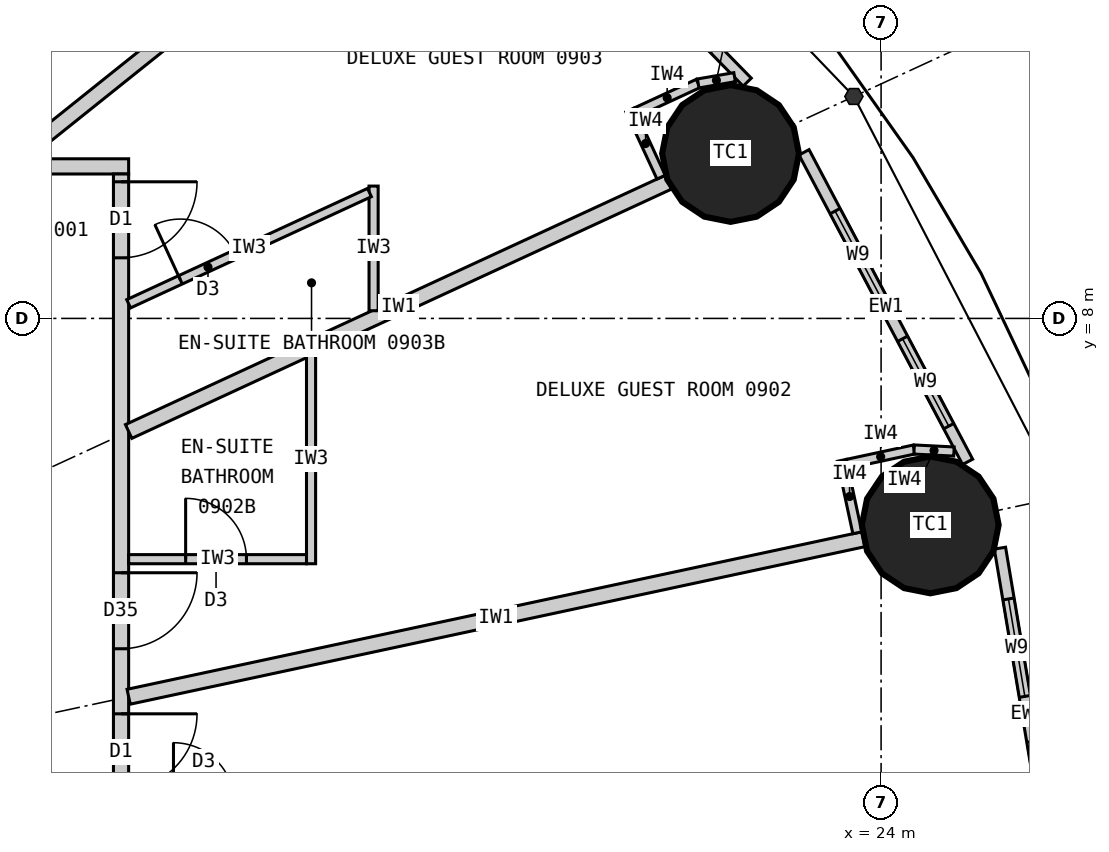
"""IFC4 building model, lengths in metres.
Left out: names, types, materials, properties, quantities, classifications, styles, units other than length and angle.
Written with IfcOpenShell. Run it as: python <this file> out.ifc"""

import sys

from ifc_helpers import new_model, si_unit, direction, frame, frame_2d, origin, origin_2d, place, context, subcontext, project, spatial, rectangle, circle, extrude, element, fill, save


model = new_model("IFC4")
c1 = context("Model", 3, precision=1e-05, world=origin(), true_north=direction((0.0, 1.0)))
c2 = subcontext(c1, "Body", "Model", "MODEL_VIEW")
j1 = project(units=[si_unit("LENGTHUNIT", "METRE"), si_unit("PLANEANGLEUNIT", "RADIAN")], contexts=[c1])
p1 = place(None, origin())
s1 = spatial("IfcSite", under=j1, at=p1, CompositionType="ELEMENT")
p2 = place(p1, origin())
s2 = spatial("IfcBuilding", under=s1, at=p2, CompositionType="ELEMENT")
p3 = place(p2, frame((0.0, 0.0, 42.6)))
s3 = spatial("IfcBuildingStorey", under=s2, at=p3, CompositionType="ELEMENT", Elevation=42.6)
for number, where, z_axis, x_axis in (
    (1, (24.647, 5.283, 0.0), (0.0, 0.0, 1.0), (1.0, 0.0, 0.0)),
    (2, (22.019, 10.17, 0.0), (0.0, 0.0, 1.0), (1.0, 0.0, 0.0)),
):
    element("IfcColumn", number, at=place(p3, frame(where, z_axis=z_axis, x_axis=x_axis)), inside=s3, PredefinedType="COLUMN", context=c2, shape_type="SweptSolid", body=[
        extrude(circle(Radius=0.9, at=origin_2d()), origin(), (0.0, 0.0, 1.0), 3.3),
    ])
p4 = place(p3, frame((26.297, 0.611, 0.0), z_axis=(0.0, 0.0, 1.0), x_axis=(-0.165641751141, 0.986185991727, 0.0)))
e3 = element("IfcWall", 3, at=p4, inside=s3, PredefinedType="ELEMENTEDWALL", context=c2, shape_type="SweptSolid", body=[
    extrude(rectangle(XDim=4.428, YDim=0.15, at=frame_2d((2.214, 0.0))), origin(), (0.0, 0.0, 1.0), 3.05),
])
p5 = place(p4, frame((0.55, 0.0, 0.9)))
e4 = element("IfcOpeningElement", 4, at=p5, cuts=e3, PredefinedType="OPENING", context=c2, shape_type="SweptSolid", body=[
    extrude(rectangle(XDim=1.3, YDim=1.9, at=frame_2d((0.65, 0.95))), frame((0.0, 0.085, 0.0), z_axis=(0.0, -1.0, 0.0), x_axis=(1.0, 0.0, 0.0)), (0.0, 0.0, 1.0), 0.17),
])
p6 = place(p4, frame((2.45, 0.0, 0.9)))
e5 = element("IfcOpeningElement", 5, at=p6, cuts=e3, PredefinedType="OPENING", context=c2, shape_type="SweptSolid", body=[
    extrude(rectangle(XDim=1.3, YDim=1.9, at=frame_2d((0.65, 0.95))), frame((0.0, 0.085, 0.0), z_axis=(0.0, -1.0, 0.0), x_axis=(1.0, 0.0, 0.0)), (0.0, 0.0, 1.0), 0.17),
])
p7 = place(p3, frame((25.139, 6.113, 0.0), z_axis=(0.0, 0.0, 1.0), x_axis=(-0.467303182954, 0.884097129959, 0.0)))
e6 = element("IfcWall", 6, at=p7, inside=s3, PredefinedType="ELEMENTEDWALL", context=c2, shape_type="SweptSolid", body=[
    extrude(rectangle(XDim=4.606, YDim=0.15, at=frame_2d((2.303, 0.0))), origin(), (0.0, 0.0, 1.0), 3.05),
])
p8 = place(p7, frame((0.531, 0.0, 0.9)))
e7 = element("IfcOpeningElement", 7, at=p8, cuts=e6, PredefinedType="OPENING", context=c2, shape_type="SweptSolid", body=[
    extrude(rectangle(XDim=1.3, YDim=1.9, at=frame_2d((0.65, 0.95))), frame((0.0, 0.085, 0.0), z_axis=(0.0, -1.0, 0.0), x_axis=(1.0, 0.0, 0.0)), (0.0, 0.0, 1.0), 0.17),
])
p9 = place(p7, frame((2.432, 0.0, 0.9)))
e8 = element("IfcOpeningElement", 8, at=p9, cuts=e6, PredefinedType="OPENING", context=c2, shape_type="SweptSolid", body=[
    extrude(rectangle(XDim=1.3, YDim=1.9, at=frame_2d((0.65, 0.95))), frame((0.0, 0.085, 0.0), z_axis=(0.0, -1.0, 0.0), x_axis=(1.0, 0.0, 0.0)), (0.0, 0.0, 1.0), 0.17),
])
p10 = place(p3, frame((22.239, 11.108, 0.0), z_axis=(0.0, 0.0, 1.0), x_axis=(-0.699612594083, 0.714522370679, 0.0)))
e9 = element("IfcWall", 9, at=p10, inside=s3, PredefinedType="ELEMENTEDWALL", context=c2, shape_type="SweptSolid", body=[
    extrude(rectangle(XDim=4.896, YDim=0.15, at=frame_2d((2.448, 0.0))), origin(), (0.0, 0.0, 1.0), 3.05),
])
p11 = place(p10, frame((0.619, 0.0, 0.9)))
e10 = element("IfcOpeningElement", 10, at=p11, cuts=e9, PredefinedType="OPENING", context=c2, shape_type="SweptSolid", body=[
    extrude(rectangle(XDim=1.3, YDim=1.9, at=frame_2d((0.65, 0.95))), frame((0.0, 0.085, 0.0), z_axis=(0.0, -1.0, 0.0), x_axis=(1.0, 0.0, 0.0)), (0.0, 0.0, 1.0), 0.17),
])
p12 = place(p10, frame((2.519, 0.0, 0.9)))
e11 = element("IfcOpeningElement", 11, at=p12, cuts=e9, PredefinedType="OPENING", context=c2, shape_type="SweptSolid", body=[
    extrude(rectangle(XDim=1.3, YDim=1.9, at=frame_2d((0.65, 0.95))), frame((0.0, 0.085, 0.0), z_axis=(0.0, -1.0, 0.0), x_axis=(1.0, 0.0, 0.0)), (0.0, 0.0, 1.0), 0.17),
])
p13 = place(p3, frame((-14.1, 10.0, 0.0), z_axis=(0.0, 0.0, 1.0), x_axis=(1.0, 0.0, 0.0)))
e12 = element("IfcWall", 12, at=p13, inside=s3, PredefinedType="PARTITIONING", context=c2, shape_type="SweptSolid", body=[
    extrude(rectangle(XDim=28.2, YDim=0.2, at=frame_2d((14.1, 0.0))), origin(), (0.0, 0.0, 1.0), 3.05),
])
p14 = place(p13, frame((23.477, 0.0, 0.0)))
e13 = element("IfcOpeningElement", 13, at=p14, cuts=e12, PredefinedType="OPENING", context=c2, shape_type="SweptSolid", body=[
    extrude(rectangle(XDim=1.0, YDim=2.2, at=frame_2d((0.5, 1.1))), frame((0.0, 0.11, 0.0), z_axis=(0.0, -1.0, 0.0), x_axis=(1.0, 0.0, 0.0)), (0.0, 0.0, 1.0), 0.22),
])
p15 = place(p13, frame((18.529, 0.0, 0.0)))
e14 = element("IfcOpeningElement", 14, at=p15, cuts=e12, PredefinedType="OPENING", context=c2, shape_type="SweptSolid", body=[
    extrude(rectangle(XDim=1.0, YDim=2.2, at=frame_2d((0.5, 1.1))), frame((0.0, 0.11, 0.0), z_axis=(0.0, -1.0, 0.0), x_axis=(1.0, 0.0, 0.0)), (0.0, 0.0, 1.0), 0.22),
])
p16 = place(p13, frame((14.623, 0.0, 0.0)))
e15 = element("IfcOpeningElement", 15, at=p16, cuts=e12, PredefinedType="OPENING", context=c2, shape_type="SweptSolid", body=[
    extrude(rectangle(XDim=1.0, YDim=2.2, at=frame_2d((0.5, 1.1))), frame((0.0, 0.11, 0.0), z_axis=(0.0, -1.0, 0.0), x_axis=(1.0, 0.0, 0.0)), (0.0, 0.0, 1.0), 0.22),
])
p17 = place(p13, frame((11.252, 0.0, 0.0)))
e16 = element("IfcOpeningElement", 16, at=p17, cuts=e12, PredefinedType="OPENING", context=c2, shape_type="SweptSolid", body=[
    extrude(rectangle(XDim=1.0, YDim=2.1, at=frame_2d((0.5, 1.05))), frame((0.0, 0.11, 0.0), z_axis=(0.0, -1.0, 0.0), x_axis=(1.0, 0.0, 0.0)), (0.0, 0.0, 1.0), 0.22),
])
p18 = place(p13, frame((8.671, 0.0, 0.0)))
e17 = element("IfcOpeningElement", 17, at=p18, cuts=e12, PredefinedType="OPENING", context=c2, shape_type="SweptSolid", body=[
    extrude(rectangle(XDim=1.0, YDim=2.2, at=frame_2d((0.5, 1.1))), frame((0.0, 0.11, 0.0), z_axis=(0.0, -1.0, 0.0), x_axis=(1.0, 0.0, 0.0)), (0.0, 0.0, 1.0), 0.22),
])
p19 = place(p13, frame((1.616, 0.0, 0.0)))
e18 = element("IfcOpeningElement", 18, at=p19, cuts=e12, PredefinedType="OPENING", context=c2, shape_type="SweptSolid", body=[
    extrude(rectangle(XDim=1.0, YDim=2.2, at=frame_2d((0.5, 1.1))), frame((0.0, 0.11, 0.0), z_axis=(0.0, -1.0, 0.0), x_axis=(1.0, 0.0, 0.0)), (0.0, 0.0, 1.0), 0.22),
])
p20 = place(p3, frame((14.0, -9.9, 0.0), z_axis=(0.0, 0.0, 1.0), x_axis=(0.0, 1.0, 0.0)))
e19 = element("IfcWall", 19, at=p20, inside=s3, PredefinedType="PARTITIONING", context=c2, shape_type="SweptSolid", body=[
    extrude(rectangle(XDim=19.8, YDim=0.2, at=frame_2d((9.9, 0.0))), origin(), (0.0, 0.0, 1.0), 3.05),
])
p21 = place(p20, frame((11.698, 0.0, 0.0)))
e20 = element("IfcOpeningElement", 20, at=p21, cuts=e19, PredefinedType="OPENING", context=c2, shape_type="SweptSolid", body=[
    extrude(rectangle(XDim=1.0, YDim=2.2, at=frame_2d((0.5, 1.1))), frame((0.0, 0.11, 0.0), z_axis=(0.0, -1.0, 0.0), x_axis=(1.0, 0.0, 0.0)), (0.0, 0.0, 1.0), 0.22),
])
p22 = place(p20, frame((13.554, 0.0, 0.0)))
e21 = element("IfcOpeningElement", 21, at=p22, cuts=e19, PredefinedType="OPENING", context=c2, shape_type="SweptSolid", body=[
    extrude(rectangle(XDim=1.0, YDim=2.0, at=frame_2d((0.5, 1.0))), frame((0.0, 0.11, 0.0), z_axis=(0.0, -1.0, 0.0), x_axis=(1.0, 0.0, 0.0)), (0.0, 0.0, 1.0), 0.22),
])
p23 = place(p20, frame((18.698, 0.0, 0.0)))
e22 = element("IfcOpeningElement", 22, at=p23, cuts=e19, PredefinedType="OPENING", context=c2, shape_type="SweptSolid", body=[
    extrude(rectangle(XDim=1.0, YDim=2.2, at=frame_2d((0.5, 1.1))), frame((0.0, 0.11, 0.0), z_axis=(0.0, -1.0, 0.0), x_axis=(1.0, 0.0, 0.0)), (0.0, 0.0, 1.0), 0.22),
])
p24 = place(p20, frame((0.975, 0.0, 0.0)))
e23 = element("IfcOpeningElement", 23, at=p24, cuts=e19, PredefinedType="OPENING", context=c2, shape_type="SweptSolid", body=[
    extrude(rectangle(XDim=1.0, YDim=2.2, at=frame_2d((0.5, 1.1))), frame((0.0, 0.11, 0.0), z_axis=(0.0, -1.0, 0.0), x_axis=(1.0, 0.0, 0.0)), (0.0, 0.0, 1.0), 0.22),
])
p25 = place(p20, frame((7.097, 0.0, 0.0)))
e24 = element("IfcOpeningElement", 24, at=p25, cuts=e19, PredefinedType="OPENING", context=c2, shape_type="SweptSolid", body=[
    extrude(rectangle(XDim=1.0, YDim=2.2, at=frame_2d((0.5, 1.1))), frame((0.0, 0.11, 0.0), z_axis=(0.0, -1.0, 0.0), x_axis=(1.0, 0.0, 0.0)), (0.0, 0.0, 1.0), 0.22),
])
p26 = place(p3, frame((14.1, 3.022, 0.0), z_axis=(0.0, 0.0, 1.0), x_axis=(0.977786510688, 0.209603290805, 0.0)))
e25 = element("IfcWall", 25, at=p26, inside=s3, PredefinedType="PARTITIONING", context=c2, shape_type="SweptSolid", body=[
    extrude(rectangle(XDim=9.887, YDim=0.2, at=frame_2d((4.943, 0.0))), origin(), (0.0, 0.0, 1.0), 2.05),
])
p27 = place(p3, frame((14.1, 6.512, 0.0), z_axis=(0.0, 0.0, 1.0), x_axis=(0.907842433118, 0.41931147925, 0.0)))
e26 = element("IfcWall", 26, at=p27, inside=s3, PredefinedType="PARTITIONING", context=c2, shape_type="SweptSolid", body=[
    extrude(rectangle(XDim=7.823, YDim=0.2, at=frame_2d((3.912, 0.0))), origin(), (0.0, 0.0, 1.0), 2.15),
])
p28 = place(p3, frame((12.625, 10.1, 0.0), z_axis=(0.0, 0.0, 1.0), x_axis=(0.780872884676, 0.624689953479, 0.0)))
e27 = element("IfcWall", 27, at=p28, inside=s3, PredefinedType="PARTITIONING", context=c2, shape_type="SweptSolid", body=[
    extrude(rectangle(XDim=5.845, YDim=0.2, at=frame_2d((2.922, 0.0))), origin(), (0.0, 0.0, 1.0), 2.15),
])
p29 = place(p3, frame((16.5, 7.521, 0.0), z_axis=(0.0, 0.0, 1.0), x_axis=(0.0, -1.0, 0.0)))
e28 = element("IfcWall", 28, at=p29, inside=s3, PredefinedType="PARTITIONING", context=c2, shape_type="SweptSolid", body=[
    extrude(rectangle(XDim=2.749, YDim=0.12, at=frame_2d((1.374, 0.0))), origin(), (0.0, 0.0, 1.0), 3.05),
])
p30 = place(p3, frame((14.1, 4.833, 0.0), z_axis=(0.0, 0.0, 1.0), x_axis=(1.0, 0.0, 0.0)))
e29 = element("IfcWall", 29, at=p30, inside=s3, PredefinedType="PARTITIONING", context=c2, shape_type="SweptSolid", body=[
    extrude(rectangle(XDim=2.34, YDim=0.12, at=frame_2d((1.17, 0.0))), origin(), (0.0, 0.0, 1.0), 3.05),
])
p31 = place(p30, frame((0.75, 0.0, 0.0)))
e30 = element("IfcOpeningElement", 30, at=p31, cuts=e29, PredefinedType="OPENING", context=c2, shape_type="SweptSolid", body=[
    extrude(rectangle(XDim=0.8, YDim=2.1, at=frame_2d((0.4, 1.05))), frame((0.0, 0.07, 0.0), z_axis=(0.0, -1.0, 0.0), x_axis=(1.0, 0.0, 0.0)), (0.0, 0.0, 1.0), 0.14),
])
p32 = place(p3, frame((17.323, 8.101, 0.0), z_axis=(0.0, 0.0, 1.0), x_axis=(0.0, 1.0, 0.0)))
e31 = element("IfcWall", 31, at=p32, inside=s3, PredefinedType="PARTITIONING", context=c2, shape_type="SweptSolid", body=[
    extrude(rectangle(XDim=1.64, YDim=0.12, at=frame_2d((0.82, 0.0))), origin(), (0.0, 0.0, 1.0), 3.05),
])
p33 = place(p3, frame((14.1, 8.193, 0.0), z_axis=(0.0, 0.0, 1.0), x_axis=(0.907836493557, 0.419324338628, 0.0)))
e32 = element("IfcWall", 32, at=p33, inside=s3, PredefinedType="PARTITIONING", context=c2, shape_type="SweptSolid", body=[
    extrude(rectangle(XDim=3.49, YDim=0.12, at=frame_2d((1.745, 0.0))), origin(), (0.0, 0.0, 1.0), 3.05),
])
p34 = place(p33, frame((0.75, 0.0, 0.0)))
e33 = element("IfcOpeningElement", 33, at=p34, cuts=e32, PredefinedType="OPENING", context=c2, shape_type="SweptSolid", body=[
    extrude(rectangle(XDim=0.8, YDim=2.1, at=frame_2d((0.4, 1.05))), frame((0.0, 0.07, 0.0), z_axis=(0.0, -1.0, 0.0), x_axis=(1.0, 0.0, 0.0)), (0.0, 0.0, 1.0), 0.14),
])
p35 = place(p3, frame((23.687, 5.18, 0.0), z_axis=(0.0, 0.0, 1.0), x_axis=(-0.209443540911, 0.977820741839, 0.0)))
e34 = element("IfcWall", 34, at=p35, inside=s3, PredefinedType="PARTITIONING", context=c2, shape_type="SweptSolid", body=[
    extrude(rectangle(XDim=0.975, YDim=0.12, at=frame_2d((0.487, 0.0))), origin(), (0.0, 0.0, 1.0), 3.05),
])
p36 = place(p3, frame((23.554, 6.087, 0.0), z_axis=(0.0, 0.0, 1.0), x_axis=(0.977762694187, 0.209714362543, 0.0)))
e35 = element("IfcWall", 35, at=p36, inside=s3, PredefinedType="PARTITIONING", context=c2, shape_type="SweptSolid", body=[
    extrude(rectangle(XDim=0.9, YDim=0.12, at=frame_2d((0.45, 0.0))), origin(), (0.0, 0.0, 1.0), 3.05),
])
p37 = place(p3, frame((24.434, 6.275, 0.0), z_axis=(0.0, 0.0, 1.0), x_axis=(0.998714959873, -0.050679669751, 0.0)))
e36 = element("IfcWall", 36, at=p37, inside=s3, PredefinedType="PARTITIONING", context=c2, shape_type="SweptSolid", body=[
    extrude(rectangle(XDim=0.525, YDim=0.12, at=frame_2d((0.263, 0.0))), origin(), (0.0, 0.0, 1.0), 3.05),
])
p38 = place(p3, frame((21.106, 9.858, 0.0), z_axis=(0.0, 0.0, 1.0), x_axis=(-0.419344098106, 0.907827366509, 0.0)))
e37 = element("IfcWall", 37, at=p38, inside=s3, PredefinedType="PARTITIONING", context=c2, shape_type="SweptSolid", body=[
    extrude(rectangle(XDim=0.975, YDim=0.12, at=frame_2d((0.487, 0.0))), origin(), (0.0, 0.0, 1.0), 3.05),
])
p39 = place(p3, frame((20.777, 10.714, 0.0), z_axis=(0.0, 0.0, 1.0), x_axis=(0.907832324198, 0.419333365166, 0.0)))
e38 = element("IfcWall", 38, at=p39, inside=s3, PredefinedType="PARTITIONING", context=c2, shape_type="SweptSolid", body=[
    extrude(rectangle(XDim=0.9, YDim=0.12, at=frame_2d((0.45, 0.0))), origin(), (0.0, 0.0, 1.0), 3.05),
])
p40 = place(p3, frame((21.594, 11.091, 0.0), z_axis=(0.0, 0.0, 1.0), x_axis=(0.985483306792, 0.169772353566, 0.0)))
e39 = element("IfcWall", 39, at=p40, inside=s3, PredefinedType="PARTITIONING", context=c2, shape_type="SweptSolid", body=[
    extrude(rectangle(XDim=0.486, YDim=0.12, at=frame_2d((0.243, 0.0))), origin(), (0.0, 0.0, 1.0), 3.05),
])
p41 = place(p6, origin())
e40 = element("IfcWindow", 40, at=p41, inside=s3, PartitioningType="SINGLE_PANEL", PredefinedType="WINDOW", context=c2, shape_type="SweptSolid", body=[
    extrude(rectangle(XDim=1.3, YDim=1.9, at=frame_2d((0.65, 0.95))), frame((0.0, 0.03, 0.0), z_axis=(0.0, -1.0, 0.0), x_axis=(1.0, 0.0, 0.0)), (0.0, 0.0, 1.0), 0.06),
])
fill(e5, e40)
p42 = place(p8, origin())
e41 = element("IfcWindow", 41, at=p42, inside=s3, PartitioningType="SINGLE_PANEL", PredefinedType="WINDOW", context=c2, shape_type="SweptSolid", body=[
    extrude(rectangle(XDim=1.3, YDim=1.9, at=frame_2d((0.65, 0.95))), frame((0.0, 0.03, 0.0), z_axis=(0.0, -1.0, 0.0), x_axis=(1.0, 0.0, 0.0)), (0.0, 0.0, 1.0), 0.06),
])
fill(e7, e41)
p43 = place(p9, origin())
e42 = element("IfcWindow", 42, at=p43, inside=s3, PartitioningType="SINGLE_PANEL", PredefinedType="WINDOW", context=c2, shape_type="SweptSolid", body=[
    extrude(rectangle(XDim=1.3, YDim=1.9, at=frame_2d((0.65, 0.95))), frame((0.0, 0.03, 0.0), z_axis=(0.0, -1.0, 0.0), x_axis=(1.0, 0.0, 0.0)), (0.0, 0.0, 1.0), 0.06),
])
fill(e8, e42)
p44 = place(p21, origin())
e43 = element("IfcDoor", 43, at=p44, inside=s3, OperationType="SINGLE_SWING_RIGHT", PredefinedType="DOOR", context=c2, shape_type="SweptSolid", body=[
    extrude(rectangle(XDim=1.0, YDim=2.2, at=frame_2d((0.5, 1.1))), frame((0.0, 0.025, 0.0), z_axis=(0.0, -1.0, 0.0), x_axis=(1.0, 0.0, 0.0)), (0.0, 0.0, 1.0), 0.05),
])
fill(e20, e43)
p45 = place(p31, origin())
e44 = element("IfcDoor", 44, at=p45, inside=s3, OperationType="SINGLE_SWING_LEFT", PredefinedType="DOOR", context=c2, shape_type="SweptSolid", body=[
    extrude(rectangle(XDim=0.8, YDim=2.1, at=frame_2d((0.4, 1.05))), frame((0.0, 0.025, 0.0), z_axis=(0.0, -1.0, 0.0), x_axis=(1.0, 0.0, 0.0)), (0.0, 0.0, 1.0), 0.05),
])
fill(e30, e44)
p46 = place(p22, origin())
e45 = element("IfcDoor", 45, at=p46, inside=s3, OperationType="SINGLE_SWING_RIGHT", PredefinedType="DOOR", context=c2, shape_type="SweptSolid", body=[
    extrude(rectangle(XDim=1.0, YDim=2.0, at=frame_2d((0.5, 1.0))), frame((0.0, 0.025, 0.0), z_axis=(0.0, -1.0, 0.0), x_axis=(1.0, 0.0, 0.0)), (0.0, 0.0, 1.0), 0.05),
])
fill(e21, e45)
p47 = place(p34, origin())
e46 = element("IfcDoor", 46, at=p47, inside=s3, OperationType="SINGLE_SWING_LEFT", PredefinedType="DOOR", context=c2, shape_type="SweptSolid", body=[
    extrude(rectangle(XDim=0.8, YDim=2.1, at=frame_2d((0.4, 1.05))), frame((0.0, 0.025, 0.0), z_axis=(0.0, -1.0, 0.0), x_axis=(1.0, 0.0, 0.0)), (0.0, 0.0, 1.0), 0.05),
])
fill(e33, e46)
p48 = place(p23, origin())
e47 = element("IfcDoor", 47, at=p48, inside=s3, OperationType="SINGLE_SWING_RIGHT", PredefinedType="DOOR", context=c2, shape_type="SweptSolid", body=[
    extrude(rectangle(XDim=1.0, YDim=2.2, at=frame_2d((0.5, 1.1))), frame((0.0, 0.025, 0.0), z_axis=(0.0, -1.0, 0.0), x_axis=(1.0, 0.0, 0.0)), (0.0, 0.0, 1.0), 0.05),
])
fill(e22, e47)
save(model, sys.argv[1])
